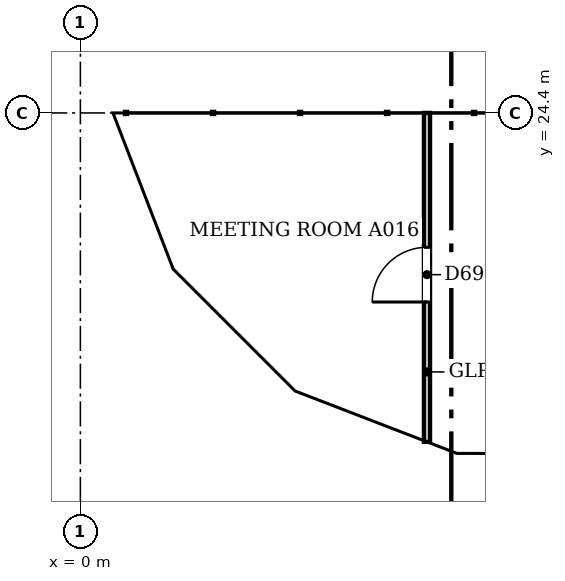
"""IFC4 building model, lengths in metres.
Left out: names, types, materials, properties, quantities, classifications, styles, units other than length and angle.
Written with IfcOpenShell. Run it as: python <this file> out.ifc"""

import sys

from ifc_helpers import new_model, si_unit, direction, frame, frame_2d, origin, place, context, subcontext, project, spatial, polyline, rectangle, outline, extrude, faceted_brep, source, transform, mapped, element, fill, save


model = new_model("IFC4")
c1 = context("Model", 3, precision=1e-05, world=origin(), true_north=direction((0.0, 1.0)))
c2 = subcontext(c1, "Body", "Model", "MODEL_VIEW")
j1 = project(units=[si_unit("LENGTHUNIT", "METRE"), si_unit("PLANEANGLEUNIT", "RADIAN")], contexts=[c1])
p1 = place(None, origin())
s1 = spatial("IfcSite", under=j1, at=p1, CompositionType="ELEMENT")
p2 = place(p1, origin())
s2 = spatial("IfcBuilding", under=s1, at=p2, CompositionType="ELEMENT")
p3 = place(p2, frame((0.0, 0.0, 131.6)))
s3 = spatial("IfcBuildingStorey", under=s2, at=p3, CompositionType="ELEMENT", Elevation=131.6)
m1 = source(origin(), c2, "Body", "Brep", [
    faceted_brep([(3.003, -0.25, 0.0), (3.05, -0.25, 0.06), (3.05, -0.25, 7.54), (3.003, -0.25, 7.6), (0.0, -0.25, 3.8), (0.0, 0.25, 3.8), (2.957, 0.25, 7.541), (2.957, 0.25, 0.059), (3.003, 0.0, 0.0), (3.003, 0.0, 7.6)], [[[0, 1, 2, 3, 4]], [[5, 6, 7]], [[1, 0, 8]], [[9, 3, 2]], [[6, 5, 4, 3, 9]], [[5, 7, 8, 0, 4]], [[1, 8, 7, 6, 9, 2]]]),
])
p4 = place(p3, frame((0.25, 27.45, -3.8), z_axis=(0.0, 0.0, 1.0), x_axis=(0.0, -1.0, 0.0)))
e1 = element("IfcWall", 1, at=p4, inside=s3, PredefinedType="SOLIDWALL", context=c2, shape_type="MappedRepresentation", body=[
    mapped(m1, transform((0.0, 0.0, 0.0), scale=1.0)),
])
m2 = source(origin(), c2, "Body", "SweptSolid", [
    extrude(outline(polyline([(2.803, 6.944), (0.319, 3.8), (2.803, 0.656), (2.803, 6.944)])), frame((0.0, 0.26, 0.0), z_axis=(0.0, -1.0, 0.0), x_axis=(1.0, 0.0, 0.0)), (0.0, 0.0, 1.0), 0.52),
])
p5 = place(p4, origin())
e2 = element("IfcOpeningElement", 2, at=p5, cuts=e1, PredefinedType="OPENING", context=c2, shape_type="MappedRepresentation", body=[
    mapped(m2, transform((0.0, 0.0, 0.0), scale=1.0)),
])
m3 = source(origin(), c2, "Body", "Brep", [
    faceted_brep([(0.047, -0.25, 0.0), (2.997, -0.25, 3.8), (0.047, -0.25, 7.6), (0.0, -0.25, 7.541), (0.0, -0.25, 0.059), (0.093, 0.25, 7.54), (2.944, 0.25, 3.868), (2.944, 0.25, 3.732), (0.093, 0.25, 0.06), (2.997, 0.0, 3.8), (0.047, 0.0, 0.0), (0.047, 0.0, 7.6)], [[[0, 1, 2, 3, 4]], [[5, 6, 7, 8]], [[8, 7, 9, 1, 0, 10]], [[6, 5, 11, 2, 1, 9]], [[3, 2, 11]], [[10, 0, 4]], [[8, 10, 4, 3, 11, 5]], [[7, 6, 9]]]),
])
p6 = place(p3, frame((0.233, 24.49, -3.8), z_axis=(0.0, 0.0, 1.0), x_axis=(0.359901446078, -0.932990326376, 0.0)))
e3 = element("IfcWall", 3, at=p6, inside=s3, PredefinedType="SOLIDWALL", context=c2, shape_type="MappedRepresentation", body=[
    mapped(m3, transform((0.0, 0.0, 0.0), scale=1.0)),
])
m4 = source(origin(), c2, "Body", "SweptSolid", [
    extrude(outline(polyline([(0.247, 0.665), (2.681, 3.8), (0.247, 6.935), (0.247, 0.665)])), frame((0.0, 0.26, 0.0), z_axis=(0.0, -1.0, 0.0), x_axis=(1.0, 0.0, 0.0)), (0.0, 0.0, 1.0), 0.52),
])
p7 = place(p6, origin())
e4 = element("IfcOpeningElement", 4, at=p7, cuts=e3, PredefinedType="OPENING", context=c2, shape_type="MappedRepresentation", body=[
    mapped(m4, transform((0.0, 0.0, 0.0), scale=1.0)),
])
m5 = source(origin(), c2, "Body", "Brep", [
    faceted_brep([(2.944, -0.25, 0.0), (2.997, -0.25, 0.068), (2.997, -0.25, 7.532), (2.944, -0.25, 7.6), (0.0, -0.25, 3.8), (0.053, 0.25, 3.868), (2.891, 0.25, 7.532), (2.891, 0.25, 0.068), (0.053, 0.25, 3.732), (2.944, 0.0, 0.0), (2.944, 0.0, 7.6), (0.0, 0.0, 3.8)], [[[0, 1, 2, 3, 4]], [[5, 6, 7, 8]], [[1, 0, 9]], [[10, 3, 2]], [[6, 5, 11, 4, 3, 10]], [[8, 7, 9, 0, 4, 11]], [[8, 11, 5]], [[1, 9, 7, 6, 10, 2]]]),
])
p8 = place(p3, frame((1.312, 21.694, -3.8), z_axis=(0.0, 0.0, 1.0), x_axis=(0.707066050402, -0.707147509625, 0.0)))
e5 = element("IfcWall", 5, at=p8, inside=s3, PredefinedType="SOLIDWALL", context=c2, shape_type="MappedRepresentation", body=[
    mapped(m5, transform((0.0, 0.0, 0.0), scale=1.0)),
])
m6 = source(origin(), c2, "Body", "SweptSolid", [
    extrude(outline(polyline([(2.744, 6.934), (0.316, 3.8), (2.744, 0.666), (2.744, 6.934)])), frame((0.0, 0.26, 0.0), z_axis=(0.0, -1.0, 0.0), x_axis=(1.0, 0.0, 0.0)), (0.0, 0.0, 1.0), 0.52),
])
p9 = place(p8, origin())
e6 = element("IfcOpeningElement", 6, at=p9, cuts=e5, PredefinedType="OPENING", context=c2, shape_type="MappedRepresentation", body=[
    mapped(m6, transform((0.0, 0.0, 0.0), scale=1.0)),
])
m7 = source(origin(), c2, "Body", "Brep", [
    faceted_brep([(0.053, -0.25, 0.0), (3.003, -0.25, 3.8), (0.053, -0.25, 7.6), (0.0, -0.25, 7.531), (0.0, -0.25, 0.068), (0.106, 0.25, 7.532), (2.957, 0.25, 3.86), (2.957, 0.25, 3.74), (0.106, 0.25, 0.068), (3.003, 0.0, 3.8), (0.053, 0.0, 0.0), (0.053, 0.0, 7.6)], [[[0, 1, 2, 3, 4]], [[5, 6, 7, 8]], [[8, 7, 9, 1, 0, 10]], [[6, 5, 11, 2, 1, 9]], [[3, 2, 11]], [[10, 0, 4]], [[8, 10, 4, 3, 11, 5]], [[7, 6, 9]]]),
])
p10 = place(p3, frame((3.344, 19.631, -3.8), z_axis=(0.0, 0.0, 1.0), x_axis=(0.933007896601, -0.359855894603, 0.0)))
e7 = element("IfcWall", 7, at=p10, inside=s3, PredefinedType="SOLIDWALL", context=c2, shape_type="MappedRepresentation", body=[
    mapped(m7, transform((0.0, 0.0, 0.0), scale=1.0)),
])
m8 = source(origin(), c2, "Body", "SweptSolid", [
    extrude(outline(polyline([(0.253, 0.665), (2.687, 3.8), (0.253, 6.935), (0.253, 0.665)])), frame((0.0, 0.26, 0.0), z_axis=(0.0, -1.0, 0.0), x_axis=(1.0, 0.0, 0.0)), (0.0, 0.0, 1.0), 0.52),
])
p11 = place(p10, origin())
e8 = element("IfcOpeningElement", 8, at=p11, cuts=e7, PredefinedType="OPENING", context=c2, shape_type="MappedRepresentation", body=[
    mapped(m8, transform((0.0, 0.0, 0.0), scale=1.0)),
])
m9 = source(origin(), c2, "Body", "Brep", [
    faceted_brep([(3.003, -0.25, 0.0), (6.053, -0.25, 3.8), (3.003, -0.25, 7.6), (0.0, -0.25, 3.8), (0.047, 0.25, 3.859), (3.003, 0.25, 7.6), (6.053, 0.25, 3.8), (3.003, 0.25, 0.0), (0.047, 0.25, 3.741), (0.0, 0.0, 3.8)], [[[0, 1, 2, 3]], [[4, 5, 6, 7, 8]], [[7, 6, 1, 0]], [[6, 5, 2, 1]], [[5, 4, 9, 3, 2]], [[8, 7, 0, 3, 9]], [[8, 9, 4]]]),
])
p12 = place(p3, frame((6.146, 18.55, -3.8), z_axis=(0.0, 0.0, 1.0), x_axis=(1.0, 0.0, 0.0)))
e9 = element("IfcWall", 9, at=p12, inside=s3, PredefinedType="SOLIDWALL", context=c2, shape_type="MappedRepresentation", body=[
    mapped(m9, transform((0.0, 0.0, 0.0), scale=1.0)),
])
m10 = source(origin(), c2, "Body", "SweptSolid", [
    extrude(outline(polyline([(3.005, 0.401), (5.733, 3.8), (3.005, 7.199), (0.319, 3.8), (3.005, 0.401)])), frame((0.0, 0.26, 0.0), z_axis=(0.0, -1.0, 0.0), x_axis=(1.0, 0.0, 0.0)), (0.0, 0.0, 1.0), 0.52),
])
p13 = place(p12, origin())
e10 = element("IfcOpeningElement", 10, at=p13, cuts=e9, PredefinedType="OPENING", context=c2, shape_type="MappedRepresentation", body=[
    mapped(m10, transform((0.0, 0.0, 0.0), scale=1.0)),
])
p14 = place(p2, frame((0.0, 0.0, 135.4)))
s4 = spatial("IfcBuildingStorey", under=s2, at=p14, CompositionType="ELEMENT", Elevation=135.4)
m11 = source(origin(), c2, "Body", "Brep", [
    faceted_brep([(3.05, -0.25, 0.0), (6.053, -0.25, 3.8), (3.05, -0.25, 7.6), (0.0, -0.25, 3.8), (0.0, 0.25, 3.8), (3.05, 0.25, 7.6), (6.007, 0.25, 3.859), (6.007, 0.25, 3.741), (3.05, 0.25, 0.0), (6.053, 0.0, 3.8)], [[[0, 1, 2, 3]], [[4, 5, 6, 7, 8]], [[8, 7, 9, 1, 0]], [[6, 5, 2, 1, 9]], [[5, 4, 3, 2]], [[4, 8, 0, 3]], [[9, 7, 6]]]),
])
p15 = place(p14, frame((0.25, 30.5, -3.8), z_axis=(0.0, 0.0, 1.0), x_axis=(0.0, -1.0, 0.0)))
e11 = element("IfcWall", 11, at=p15, inside=s4, PredefinedType="SOLIDWALL", context=c2, shape_type="MappedRepresentation", body=[
    mapped(m11, transform((0.0, 0.0, 0.0), scale=1.0)),
])
m12 = source(origin(), c2, "Body", "SweptSolid", [
    extrude(outline(polyline([(3.049, 0.401), (5.735, 3.8), (3.049, 7.199), (0.321, 3.8), (3.049, 0.401)])), frame((0.0, 0.26, 0.0), z_axis=(0.0, -1.0, 0.0), x_axis=(1.0, 0.0, 0.0)), (0.0, 0.0, 1.0), 0.52),
])
p16 = place(p15, origin())
e12 = element("IfcOpeningElement", 12, at=p16, cuts=e11, PredefinedType="OPENING", context=c2, shape_type="MappedRepresentation", body=[
    mapped(m12, transform((0.0, 0.0, 0.0), scale=1.0)),
])
m13 = source(origin(), c2, "Body", "Brep", [
    faceted_brep([(2.95, -0.25, 0.0), (3.003, -0.25, 0.068), (3.003, -0.25, 7.531), (2.95, -0.25, 7.6), (0.0, -0.25, 3.8), (0.047, 0.25, 3.86), (2.898, 0.25, 7.532), (2.898, 0.25, 0.068), (0.047, 0.25, 3.74), (2.95, 0.0, 0.0), (2.95, 0.0, 7.6), (0.0, 0.0, 3.8)], [[[0, 1, 2, 3, 4]], [[5, 6, 7, 8]], [[1, 0, 9]], [[10, 3, 2]], [[6, 5, 11, 4, 3, 10]], [[8, 7, 9, 0, 4, 11]], [[8, 11, 5]], [[1, 9, 7, 6, 10, 2]]]),
])
p17 = place(p14, frame((0.25, 24.447, -3.8), z_axis=(0.0, 0.0, 1.0), x_axis=(0.35992665181, -0.932980602862, 0.0)))
e13 = element("IfcWall", 13, at=p17, inside=s4, PredefinedType="SOLIDWALL", context=c2, shape_type="MappedRepresentation", body=[
    mapped(m13, transform((0.0, 0.0, 0.0), scale=1.0)),
])
m14 = source(origin(), c2, "Body", "SweptSolid", [
    extrude(outline(polyline([(2.75, 6.935), (0.316, 3.8), (2.75, 0.665), (2.75, 6.935)])), frame((0.0, 0.26, 0.0), z_axis=(0.0, -1.0, 0.0), x_axis=(1.0, 0.0, 0.0)), (0.0, 0.0, 1.0), 0.52),
])
p18 = place(p17, origin())
e14 = element("IfcOpeningElement", 14, at=p18, cuts=e13, PredefinedType="OPENING", context=c2, shape_type="MappedRepresentation", body=[
    mapped(m14, transform((0.0, 0.0, 0.0), scale=1.0)),
])
m15 = source(origin(), c2, "Body", "Brep", [
    faceted_brep([(0.053, -0.25, 0.0), (2.997, -0.25, 3.8), (0.053, -0.25, 7.6), (0.0, -0.25, 7.532), (0.0, -0.25, 0.068), (0.106, 0.25, 7.531), (2.944, 0.25, 3.868), (2.944, 0.25, 3.732), (0.106, 0.25, 0.068), (2.997, 0.0, 3.8), (0.053, 0.0, 0.0), (0.053, 0.0, 7.6)], [[[0, 1, 2, 3, 4]], [[5, 6, 7, 8]], [[8, 7, 9, 1, 0, 10]], [[6, 5, 11, 2, 1, 9]], [[3, 2, 11]], [[10, 0, 4]], [[8, 10, 4, 3, 11, 5]], [[9, 7, 6]]]),
])
p19 = place(p14, frame((1.274, 21.731, -3.8), z_axis=(0.0, 0.0, 1.0), x_axis=(0.707147509625, -0.707066050402, 0.0)))
e15 = element("IfcWall", 15, at=p19, inside=s4, PredefinedType="SOLIDWALL", context=c2, shape_type="MappedRepresentation", body=[
    mapped(m15, transform((0.0, 0.0, 0.0), scale=1.0)),
])
m16 = source(origin(), c2, "Body", "SweptSolid", [
    extrude(outline(polyline([(0.253, 0.666), (2.681, 3.8), (0.253, 6.934), (0.253, 0.666)])), frame((0.0, 0.26, 0.0), z_axis=(0.0, -1.0, 0.0), x_axis=(1.0, 0.0, 0.0)), (0.0, 0.0, 1.0), 0.52),
])
p20 = place(p19, origin())
e16 = element("IfcOpeningElement", 16, at=p20, cuts=e15, PredefinedType="OPENING", context=c2, shape_type="MappedRepresentation", body=[
    mapped(m16, transform((0.0, 0.0, 0.0), scale=1.0)),
])
m17 = source(origin(), c2, "Body", "Brep", [
    faceted_brep([(2.95, -0.25, 0.0), (2.997, -0.25, 0.059), (2.997, -0.25, 7.541), (2.95, -0.25, 7.6), (0.0, -0.25, 3.8), (0.053, 0.25, 3.868), (2.904, 0.25, 7.54), (2.904, 0.25, 0.06), (0.053, 0.25, 3.732), (2.95, 0.0, 0.0), (2.95, 0.0, 7.6), (0.0, 0.0, 3.8)], [[[0, 1, 2, 3, 4]], [[5, 6, 7, 8]], [[1, 0, 9]], [[10, 3, 2]], [[6, 5, 11, 4, 3, 10]], [[8, 7, 9, 0, 4, 11]], [[8, 11, 5]], [[1, 9, 7, 6, 10, 2]]]),
])
p21 = place(p14, frame((3.394, 19.612, -3.8), z_axis=(0.0, 0.0, 1.0), x_axis=(0.932990326376, -0.359901446078, 0.0)))
e17 = element("IfcWall", 17, at=p21, inside=s4, PredefinedType="SOLIDWALL", context=c2, shape_type="MappedRepresentation", body=[
    mapped(m17, transform((0.0, 0.0, 0.0), scale=1.0)),
])
p22 = place(p21, origin())
e18 = element("IfcOpeningElement", 18, at=p22, cuts=e17, PredefinedType="OPENING", context=c2, shape_type="MappedRepresentation", body=[
    mapped(m14, transform((0.0, 0.0, 0.0), scale=1.0)),
])
m18 = source(origin(), c2, "Body", "Brep", [
    faceted_brep([(0.047, -0.25, 0.0), (3.05, -0.25, 3.8), (0.047, -0.25, 7.6), (0.0, -0.25, 7.54), (0.0, -0.25, 0.06), (0.093, 0.25, 7.541), (3.05, 0.25, 3.8), (0.093, 0.25, 0.059), (0.047, 0.0, 0.0), (0.047, 0.0, 7.6)], [[[0, 1, 2, 3, 4]], [[5, 6, 7]], [[7, 6, 1, 0, 8]], [[6, 5, 9, 2, 1]], [[3, 2, 9]], [[8, 0, 4]], [[7, 8, 4, 3, 9, 5]]]),
])
p23 = place(p14, frame((6.1, 18.55, -3.8), z_axis=(0.0, 0.0, 1.0), x_axis=(1.0, 0.0, 0.0)))
e19 = element("IfcWall", 19, at=p23, inside=s4, PredefinedType="SOLIDWALL", context=c2, shape_type="MappedRepresentation", body=[
    mapped(m18, transform((0.0, 0.0, 0.0), scale=1.0)),
])
m19 = source(origin(), c2, "Body", "SweptSolid", [
    extrude(outline(polyline([(0.247, 0.656), (2.731, 3.8), (0.247, 6.944), (0.247, 0.656)])), frame((0.0, 0.26, 0.0), z_axis=(0.0, -1.0, 0.0), x_axis=(1.0, 0.0, 0.0)), (0.0, 0.0, 1.0), 0.52),
])
p24 = place(p23, origin())
e20 = element("IfcOpeningElement", 20, at=p24, cuts=e19, PredefinedType="OPENING", context=c2, shape_type="MappedRepresentation", body=[
    mapped(m19, transform((0.0, 0.0, 0.0), scale=1.0)),
])
p25 = place(p3, frame((5.7, 18.99, 0.0), z_axis=(0.0, 0.0, 1.0), x_axis=(0.0, 1.0, 0.0)))
e21 = element("IfcWall", 21, at=p25, inside=s3, PredefinedType="PARTITIONING", context=c2, shape_type="SweptSolid", body=[
    extrude(rectangle(XDim=5.41, YDim=0.1, at=frame_2d((2.705, 0.0))), origin(), (0.0, 0.0, 1.0), 3.067),
])
m20 = source(origin(), c2, "Body", "SweptSolid", [
    extrude(rectangle(XDim=0.9, YDim=2.1, at=frame_2d((0.45, 1.05))), frame((0.0, 0.06, 0.0), z_axis=(0.0, -1.0, 0.0), x_axis=(1.0, 0.0, 0.0)), (0.0, 0.0, 1.0), 0.12),
])
p26 = place(p25, frame((2.3, 0.0, 0.0)))
e22 = element("IfcOpeningElement", 22, at=p26, cuts=e21, PredefinedType="OPENING", context=c2, shape_type="MappedRepresentation", body=[
    mapped(m20, transform((0.0, 0.0, 0.0), scale=1.0)),
])
m21 = source(origin(), c2, "Body", "SweptSolid", [
    extrude(rectangle(XDim=0.9, YDim=2.1, at=frame_2d((0.45, 1.05))), frame((0.0, 0.025, 0.0), z_axis=(0.0, -1.0, 0.0), x_axis=(1.0, 0.0, 0.0)), (0.0, 0.0, 1.0), 0.05),
])
p27 = place(p26, origin())
e23 = element("IfcDoor", 23, at=p27, inside=s3, OperationType="SINGLE_SWING_LEFT", PredefinedType="DOOR", context=c2, shape_type="MappedRepresentation", body=[
    mapped(m21, transform((0.0, 0.0, 0.0), scale=1.0)),
])
fill(e22, e23)
save(model, sys.argv[1])
